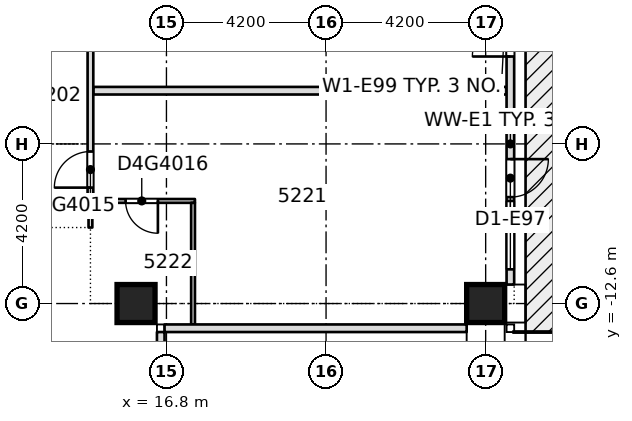
"""IFC4 building model, lengths in metres.
Left out: names, types, materials, properties, quantities, classifications, styles, units other than length and angle.
Written with IfcOpenShell. Run it as: python <this file> out.ifc"""

import sys

from ifc_helpers import new_model, si_unit, direction, frame, frame_2d, origin, origin_2d, place, context, subcontext, project, spatial, rectangle, extrude, element, fill, save


model = new_model("IFC4")
c1 = context("Model", 3, precision=1e-05, world=origin(), true_north=direction((0.0, 1.0)))
c2 = subcontext(c1, "Body", "Model", "MODEL_VIEW")
j1 = project(units=[si_unit("LENGTHUNIT", "METRE"), si_unit("PLANEANGLEUNIT", "RADIAN")], contexts=[c1])
p1 = place(None, origin())
s1 = spatial("IfcSite", under=j1, at=p1, CompositionType="ELEMENT")
p2 = place(p1, origin())
s2 = spatial("IfcBuilding", under=s1, at=p2, CompositionType="ELEMENT")
p3 = place(p2, frame((0.0, 0.0, 199.7)))
s3 = spatial("IfcBuildingStorey", under=s2, at=p3, CompositionType="ELEMENT", Elevation=199.7)
for number, where, z_axis, x_axis in (
    (1, (16.0, -12.6, -0.4), (0.0, 0.0, 1.0), (1.0, 0.0, 0.0)),
    (2, (25.2, -12.6, -0.4), (0.0, 0.0, 1.0), (1.0, 0.0, 0.0)),
):
    element("IfcColumn", number, at=place(p3, frame(where, z_axis=z_axis, x_axis=x_axis)), inside=s3, PredefinedType="COLUMN", context=c2, shape_type="SweptSolid", body=[
        extrude(rectangle(XDim=1.0, YDim=1.0, at=origin_2d()), origin(), (0.0, 0.0, 1.0), 3.45),
    ])
p4 = place(p3, frame((14.725, -9.9, 0.0), z_axis=(0.0, 0.0, 1.0), x_axis=(1.0, 0.0, 0.0)))
e3 = element("IfcWall", 3, at=p4, inside=s3, PredefinedType="PARTITIONING", context=c2, shape_type="SweptSolid", body=[
    extrude(rectangle(XDim=2.825, YDim=0.1, at=frame_2d((1.413, 0.0))), origin(), (0.0, 0.0, 1.0), 3.05),
])
p5 = place(p4, frame((1.0, 0.0, 0.0)))
e4 = element("IfcOpeningElement", 4, at=p5, cuts=e3, PredefinedType="OPENING", context=c2, shape_type="SweptSolid", body=[
    extrude(rectangle(XDim=0.85, YDim=2.1, at=frame_2d((0.425, 1.05))), frame((0.0, 0.06, 0.0), z_axis=(0.0, -1.0, 0.0), x_axis=(1.0, 0.0, 0.0)), (0.0, 0.0, 1.0), 0.12),
])
p6 = place(p3, frame((14.875, -7.0, 0.0), z_axis=(0.0, 0.0, 1.0), x_axis=(1.0, 0.0, 0.0)))
e5 = element("IfcWall", 5, at=p6, inside=s3, PredefinedType="PARTITIONING", context=c2, shape_type="SweptSolid", body=[
    extrude(rectangle(XDim=10.875, YDim=0.2, at=frame_2d((5.438, 0.0))), origin(), (0.0, 0.0, 1.0), 3.05),
])
p7 = place(p3, frame((14.8, -10.6, 0.0), z_axis=(0.0, 0.0, 1.0), x_axis=(0.0, 1.0, 0.0)))
e6 = element("IfcWall", 6, at=p7, inside=s3, PredefinedType="PARTITIONING", context=c2, shape_type="SweptSolid", body=[
    extrude(rectangle(XDim=0.65, YDim=0.1, at=frame_2d((0.325, 0.0))), origin(), (0.0, 0.0, 1.0), 3.05),
])
p8 = place(p3, frame((14.8, -9.85, 0.0), z_axis=(0.0, 0.0, 1.0), x_axis=(0.0, 1.0, 0.0)))
e7 = element("IfcWall", 7, at=p8, inside=s3, PredefinedType="PARTITIONING", context=c2, shape_type="SweptSolid", body=[
    extrude(rectangle(XDim=31.4, YDim=0.15, at=frame_2d((15.7, 0.0))), origin(), (0.0, 0.0, 1.0), 3.05),
])
p9 = place(p8, frame((0.3, 0.0, 0.0)))
e8 = element("IfcOpeningElement", 8, at=p9, cuts=e7, PredefinedType="OPENING", context=c2, shape_type="SweptSolid", body=[
    extrude(rectangle(XDim=0.95, YDim=2.1, at=frame_2d((0.475, 1.05))), frame((0.0, 0.085, 0.0), z_axis=(0.0, -1.0, 0.0), x_axis=(1.0, 0.0, 0.0)), (0.0, 0.0, 1.0), 0.17),
])
p10 = place(p8, frame((17.725, 0.0, 0.0)))
e9 = element("IfcOpeningElement", 9, at=p10, cuts=e7, PredefinedType="OPENING", context=c2, shape_type="SweptSolid", body=[
    extrude(rectangle(XDim=1.0, YDim=2.1, at=frame_2d((0.5, 1.05))), frame((0.0, 0.085, 0.0), z_axis=(0.0, -1.0, 0.0), x_axis=(1.0, 0.0, 0.0)), (0.0, 0.0, 1.0), 0.17),
])
p11 = place(p8, frame((24.8, 0.0, 0.0)))
e10 = element("IfcOpeningElement", 10, at=p11, cuts=e7, PredefinedType="OPENING", context=c2, shape_type="SweptSolid", body=[
    extrude(rectangle(XDim=0.95, YDim=2.1, at=frame_2d((0.475, 1.05))), frame((0.0, 0.085, 0.0), z_axis=(0.0, -1.0, 0.0), x_axis=(1.0, 0.0, 0.0)), (0.0, 0.0, 1.0), 0.17),
])
p12 = place(p8, frame((28.7, 0.0, 0.0)))
e11 = element("IfcOpeningElement", 11, at=p12, cuts=e7, PredefinedType="OPENING", context=c2, shape_type="SweptSolid", body=[
    extrude(rectangle(XDim=0.95, YDim=2.1, at=frame_2d((0.475, 1.05))), frame((0.0, 0.085, 0.0), z_axis=(0.0, -1.0, 0.0), x_axis=(1.0, 0.0, 0.0)), (0.0, 0.0, 1.0), 0.17),
])
p13 = place(p8, frame((9.3, 0.0, 0.0)))
e12 = element("IfcOpeningElement", 12, at=p13, cuts=e7, PredefinedType="OPENING", context=c2, shape_type="SweptSolid", body=[
    extrude(rectangle(XDim=1.1, YDim=2.1, at=frame_2d((0.55, 1.05))), frame((0.0, 0.085, 0.0), z_axis=(0.0, -1.0, 0.0), x_axis=(1.0, 0.0, 0.0)), (0.0, 0.0, 1.0), 0.17),
])
p14 = place(p8, frame((4.15, 0.0, 0.0)))
e13 = element("IfcOpeningElement", 13, at=p14, cuts=e7, PredefinedType="OPENING", context=c2, shape_type="SweptSolid", body=[
    extrude(rectangle(XDim=1.0, YDim=2.1, at=frame_2d((0.5, 1.05))), frame((0.0, 0.085, 0.0), z_axis=(0.0, -1.0, 0.0), x_axis=(1.0, 0.0, 0.0)), (0.0, 0.0, 1.0), 0.17),
])
p15 = place(p3, frame((17.5, -13.15, 0.0), z_axis=(0.0, 0.0, 1.0), x_axis=(0.0, 1.0, 0.0)))
e14 = element("IfcWall", 14, at=p15, inside=s3, PredefinedType="PARTITIONING", context=c2, shape_type="SweptSolid", body=[
    extrude(rectangle(XDim=3.2, YDim=0.1, at=frame_2d((1.6, 0.0))), origin(), (0.0, 0.0, 1.0), 3.05),
])
p16 = place(p3, frame((16.65, -20.5, 0.0), z_axis=(0.0, 0.0, 1.0), x_axis=(0.0, 1.0, 0.0)))
e15 = element("IfcWall", 15, at=p16, inside=s3, PredefinedType="STANDARD", context=c2, shape_type="SweptSolid", body=[
    extrude(rectangle(XDim=7.15, YDim=0.2, at=frame_2d((3.575, 0.0))), origin(), (0.0, 0.0, 1.0), 3.05),
])
p17 = place(p16, frame((0.4, 0.0, 0.2)))
e16 = element("IfcOpeningElement", 16, at=p17, cuts=e15, PredefinedType="OPENING", context=c2, shape_type="SweptSolid", body=[
    extrude(rectangle(XDim=1.8, YDim=2.65, at=frame_2d((0.9, 1.325))), frame((0.0, 0.11, 0.0), z_axis=(0.0, -1.0, 0.0), x_axis=(1.0, 0.0, 0.0)), (0.0, 0.0, 1.0), 0.22),
])
p18 = place(p16, frame((3.975, 0.0, 0.2)))
e17 = element("IfcOpeningElement", 17, at=p18, cuts=e15, PredefinedType="OPENING", context=c2, shape_type="SweptSolid", body=[
    extrude(rectangle(XDim=1.8, YDim=2.65, at=frame_2d((0.9, 1.325))), frame((0.0, 0.11, 0.0), z_axis=(0.0, -1.0, 0.0), x_axis=(1.0, 0.0, 0.0)), (0.0, 0.0, 1.0), 0.22),
])
p19 = place(p3, frame((16.75, -13.25, 0.0), z_axis=(0.0, 0.0, 1.0), x_axis=(1.0, 0.0, 0.0)))
e18 = element("IfcWall", 18, at=p19, inside=s3, PredefinedType="STANDARD", context=c2, shape_type="SweptSolid", body=[
    extrude(rectangle(XDim=7.95, YDim=0.2, at=frame_2d((3.975, 0.0))), origin(), (0.0, 0.0, 1.0), 3.05),
])
p20 = place(p3, frame((25.85, -12.1, 0.0), z_axis=(0.0, 0.0, 1.0), x_axis=(0.0, 1.0, 0.0)))
e19 = element("IfcWall", 19, at=p20, inside=s3, PredefinedType="STANDARD", context=c2, shape_type="SweptSolid", body=[
    extrude(rectangle(XDim=7.4, YDim=0.2, at=frame_2d((3.7, 0.0))), origin(), (0.0, 0.0, 1.0), 3.05),
])
p21 = place(p20, frame((0.4, 0.0, 0.2)))
e20 = element("IfcOpeningElement", 20, at=p21, cuts=e19, PredefinedType="OPENING", context=c2, shape_type="SweptSolid", body=[
    extrude(rectangle(XDim=1.8, YDim=2.65, at=frame_2d((0.9, 1.325))), frame((0.0, 0.11, 0.0), z_axis=(0.0, -1.0, 0.0), x_axis=(1.0, 0.0, 0.0)), (0.0, 0.0, 1.0), 0.22),
])
p22 = place(p20, frame((2.3, 0.0, 0.0)))
e21 = element("IfcOpeningElement", 21, at=p22, cuts=e19, PredefinedType="OPENING", context=c2, shape_type="SweptSolid", body=[
    extrude(rectangle(XDim=1.0, YDim=2.4, at=frame_2d((0.5, 1.2))), frame((0.0, 0.11, 0.0), z_axis=(0.0, -1.0, 0.0), x_axis=(1.0, 0.0, 0.0)), (0.0, 0.0, 1.0), 0.22),
])
p23 = place(p20, frame((6.0, 0.0, 0.0)))
e22 = element("IfcOpeningElement", 22, at=p23, cuts=e19, PredefinedType="OPENING", context=c2, shape_type="SweptSolid", body=[
    extrude(rectangle(XDim=1.0, YDim=2.4, at=frame_2d((0.5, 1.2))), frame((0.0, 0.11, 0.0), z_axis=(0.0, -1.0, 0.0), x_axis=(1.0, 0.0, 0.0)), (0.0, 0.0, 1.0), 0.22),
])
p24 = place(p9, origin())
e23 = element("IfcDoor", 23, at=p24, inside=s3, OperationType="SINGLE_SWING_RIGHT", PredefinedType="DOOR", context=c2, shape_type="SweptSolid", body=[
    extrude(rectangle(XDim=0.95, YDim=2.1, at=frame_2d((0.475, 1.05))), frame((0.0, 0.025, 0.0), z_axis=(0.0, -1.0, 0.0), x_axis=(1.0, 0.0, 0.0)), (0.0, 0.0, 1.0), 0.05),
])
fill(e8, e23)
p25 = place(p5, origin())
e24 = element("IfcDoor", 24, at=p25, inside=s3, OperationType="SINGLE_SWING_RIGHT", PredefinedType="DOOR", context=c2, shape_type="SweptSolid", body=[
    extrude(rectangle(XDim=0.85, YDim=2.1, at=frame_2d((0.425, 1.05))), frame((0.0, 0.025, 0.0), z_axis=(0.0, -1.0, 0.0), x_axis=(1.0, 0.0, 0.0)), (0.0, 0.0, 1.0), 0.05),
])
fill(e4, e24)
p26 = place(p21, origin())
e25 = element("IfcWindow", 25, at=p26, inside=s3, PartitioningType="SINGLE_PANEL", PredefinedType="WINDOW", context=c2, shape_type="SweptSolid", body=[
    extrude(rectangle(XDim=1.8, YDim=2.65, at=frame_2d((0.9, 1.325))), frame((0.0, 0.03, 0.0), z_axis=(0.0, -1.0, 0.0), x_axis=(1.0, 0.0, 0.0)), (0.0, 0.0, 1.0), 0.06),
])
fill(e20, e25)
p27 = place(p22, origin())
e26 = element("IfcDoor", 26, at=p27, inside=s3, OperationType="SINGLE_SWING_LEFT", PredefinedType="DOOR", context=c2, shape_type="SweptSolid", body=[
    extrude(rectangle(XDim=1.0, YDim=2.4, at=frame_2d((0.5, 1.2))), frame((0.0, 0.025, 0.0), z_axis=(0.0, -1.0, 0.0), x_axis=(1.0, 0.0, 0.0)), (0.0, 0.0, 1.0), 0.05),
])
fill(e21, e26)
p28 = place(p23, origin())
e27 = element("IfcDoor", 27, at=p28, inside=s3, OperationType="SINGLE_SWING_LEFT", PredefinedType="DOOR", context=c2, shape_type="SweptSolid", body=[
    extrude(rectangle(XDim=1.0, YDim=2.4, at=frame_2d((0.5, 1.2))), frame((0.0, 0.025, 0.0), z_axis=(0.0, -1.0, 0.0), x_axis=(1.0, 0.0, 0.0)), (0.0, 0.0, 1.0), 0.05),
])
fill(e22, e27)
save(model, sys.argv[1])
